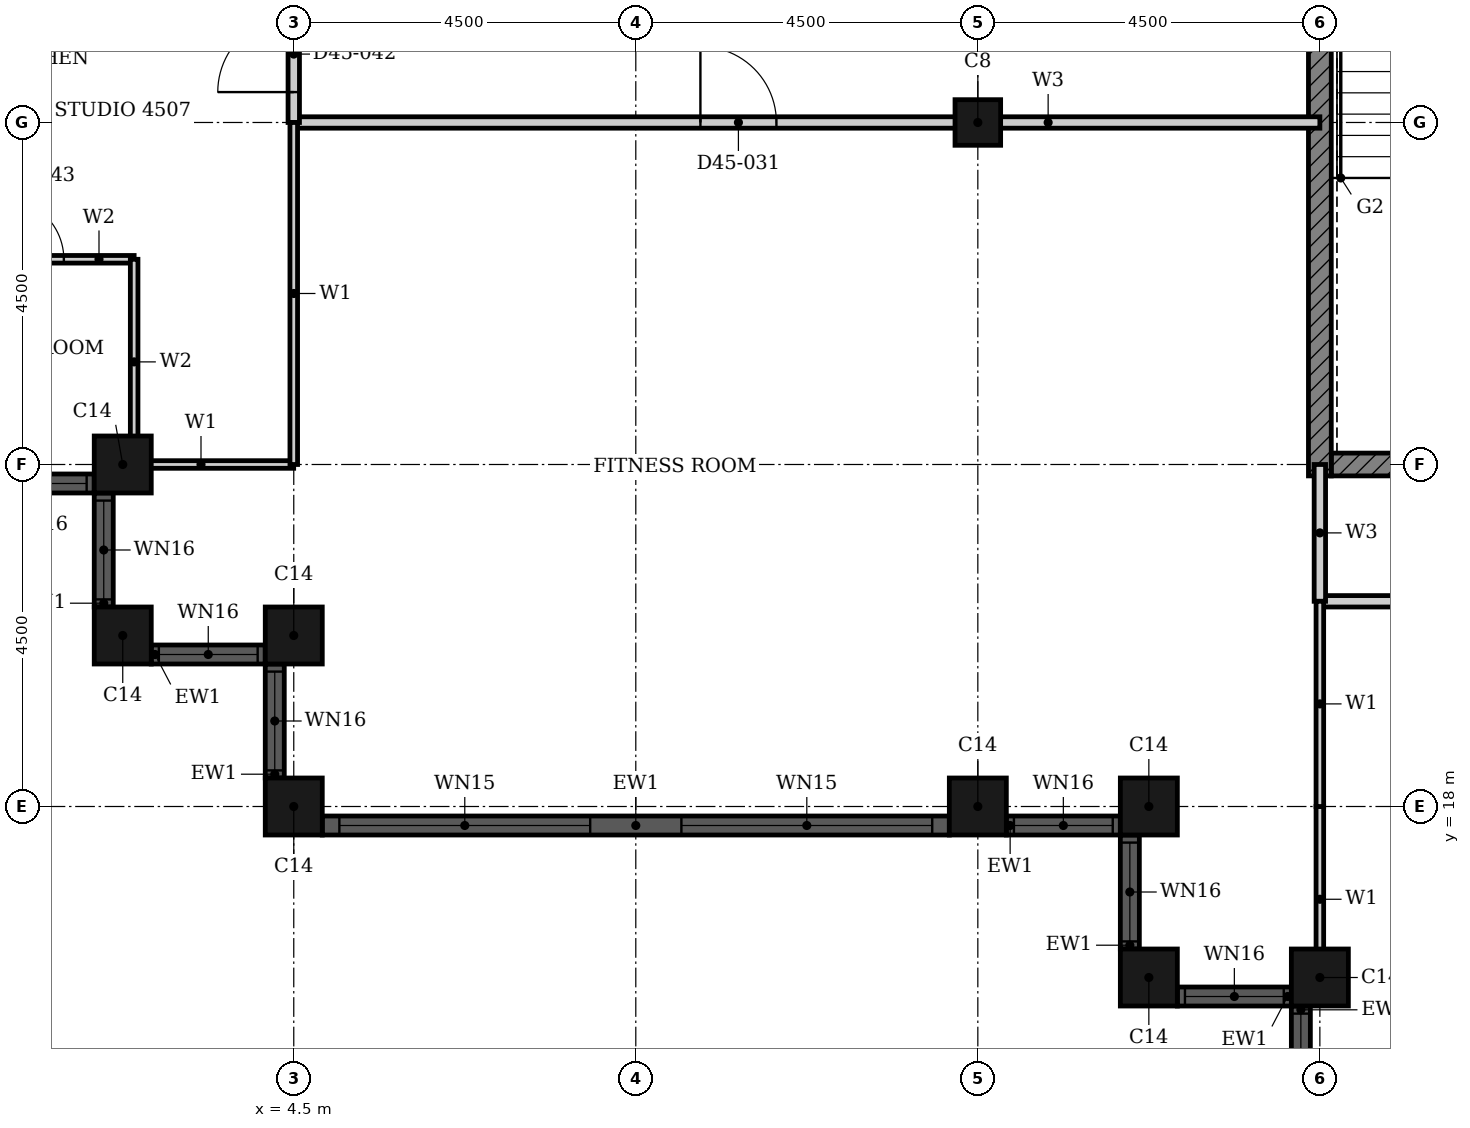
"""IFC4 building model, lengths in metres.
Left out: names, types, materials, properties, quantities, classifications, styles, units other than length and angle.
Written with IfcOpenShell. Run it as: python <this file> out.ifc"""

import sys

from ifc_helpers import new_model, si_unit, direction, frame, frame_2d, origin, origin_2d, place, context, subcontext, project, spatial, rectangle, hollow_rectangle, extrude, element, fill, save


model = new_model("IFC4")
c1 = context("Model", 3, precision=1e-05, world=origin(), true_north=direction((0.0, 1.0)))
c2 = subcontext(c1, "Body", "Model", "MODEL_VIEW")
j1 = project(units=[si_unit("LENGTHUNIT", "METRE"), si_unit("PLANEANGLEUNIT", "RADIAN")], contexts=[c1])
p1 = place(None, origin())
s1 = spatial("IfcSite", under=j1, at=p1, CompositionType="ELEMENT")
p2 = place(p1, origin())
s2 = spatial("IfcBuilding", under=s1, at=p2, CompositionType="ELEMENT")
p3 = place(p2, frame((0.0, 0.0, 180.2)))
s3 = spatial("IfcBuildingStorey", under=s2, at=p3, CompositionType="ELEMENT", Elevation=180.2)
for number, where, z_axis, x_axis in (
    (1, (2.25, 22.5, 0.0), (0.0, 0.0, 1.0), (1.0, 0.0, 0.0)),
    (2, (2.25, 20.25, 0.0), (0.0, 0.0, 1.0), (1.0, 0.0, 0.0)),
    (3, (4.5, 20.25, 0.0), (0.0, 0.0, 1.0), (1.0, 0.0, 0.0)),
    (4, (4.5, 18.0, 0.0), (0.0, 0.0, 1.0), (1.0, 0.0, 0.0)),
    (5, (13.5, 18.0, 0.0), (0.0, 0.0, 1.0), (1.0, 0.0, 0.0)),
    (6, (15.75, 18.0, 0.0), (0.0, 0.0, 1.0), (1.0, 0.0, 0.0)),
    (7, (15.75, 15.75, 0.0), (0.0, 0.0, 1.0), (1.0, 0.0, 0.0)),
    (8, (18.0, 15.75, 0.0), (0.0, 0.0, 1.0), (1.0, 0.0, 0.0)),
):
    element("IfcColumn", number, at=place(p3, frame(where, z_axis=z_axis, x_axis=x_axis)), inside=s3, PredefinedType="COLUMN", context=c2, shape_type="SweptSolid", body=[
        extrude(hollow_rectangle(XDim=0.75, YDim=0.75, WallThickness=0.024, at=origin_2d()), origin(), (0.0, 0.0, 1.0), 3.7),
    ])
p4 = place(p3, frame((13.5, 27.0, 0.0), z_axis=(0.0, 0.0, 1.0), x_axis=(1.0, 0.0, 0.0)))
e9 = element("IfcColumn", 9, at=p4, inside=s3, PredefinedType="COLUMN", context=c2, shape_type="SweptSolid", body=[
    extrude(hollow_rectangle(XDim=0.6, YDim=0.6, WallThickness=0.02, at=origin_2d()), origin(), (0.0, 0.0, 1.0), 3.7),
])
p5 = place(p3, frame((0.375, 22.25, 0.0), z_axis=(0.0, 0.0, 1.0), x_axis=(1.0, 0.0, 0.0)))
e10 = element("IfcWall", 10, at=p5, inside=s3, PredefinedType="SOLIDWALL", context=c2, shape_type="SweptSolid", body=[
    extrude(rectangle(XDim=1.5, YDim=0.25, at=frame_2d((0.75, 0.0))), origin(), (0.0, 0.0, 1.0), 3.7),
])
p6 = place(p5, frame((0.1, 0.0, 0.9)))
e11 = element("IfcOpeningElement", 11, at=p6, cuts=e10, PredefinedType="OPENING", context=c2, shape_type="SweptSolid", body=[
    extrude(rectangle(XDim=1.3, YDim=1.85, at=frame_2d((0.65, 0.925))), frame((0.0, 0.135, 0.0), z_axis=(0.0, -1.0, 0.0), x_axis=(1.0, 0.0, 0.0)), (0.0, 0.0, 1.0), 0.27),
])
p7 = place(p3, frame((2.0, 22.125, 0.0), z_axis=(0.0, 0.0, 1.0), x_axis=(0.0, -1.0, 0.0)))
e12 = element("IfcWall", 12, at=p7, inside=s3, PredefinedType="SOLIDWALL", context=c2, shape_type="SweptSolid", body=[
    extrude(rectangle(XDim=1.5, YDim=0.25, at=frame_2d((0.75, 0.0))), origin(), (0.0, 0.0, 1.0), 3.7),
])
p8 = place(p7, frame((0.1, 0.0, 0.9)))
e13 = element("IfcOpeningElement", 13, at=p8, cuts=e12, PredefinedType="OPENING", context=c2, shape_type="SweptSolid", body=[
    extrude(rectangle(XDim=1.3, YDim=1.85, at=frame_2d((0.65, 0.925))), frame((0.0, 0.135, 0.0), z_axis=(0.0, -1.0, 0.0), x_axis=(1.0, 0.0, 0.0)), (0.0, 0.0, 1.0), 0.27),
])
p9 = place(p3, frame((2.625, 20.0, 0.0), z_axis=(0.0, 0.0, 1.0), x_axis=(1.0, 0.0, 0.0)))
e14 = element("IfcWall", 14, at=p9, inside=s3, PredefinedType="SOLIDWALL", context=c2, shape_type="SweptSolid", body=[
    extrude(rectangle(XDim=1.5, YDim=0.25, at=frame_2d((0.75, 0.0))), origin(), (0.0, 0.0, 1.0), 3.7),
])
p10 = place(p9, frame((0.1, 0.0, 0.9)))
e15 = element("IfcOpeningElement", 15, at=p10, cuts=e14, PredefinedType="OPENING", context=c2, shape_type="SweptSolid", body=[
    extrude(rectangle(XDim=1.3, YDim=1.85, at=frame_2d((0.65, 0.925))), frame((0.0, 0.135, 0.0), z_axis=(0.0, -1.0, 0.0), x_axis=(1.0, 0.0, 0.0)), (0.0, 0.0, 1.0), 0.27),
])
p11 = place(p3, frame((4.25, 19.875, 0.0), z_axis=(0.0, 0.0, 1.0), x_axis=(0.0, -1.0, 0.0)))
e16 = element("IfcWall", 16, at=p11, inside=s3, PredefinedType="SOLIDWALL", context=c2, shape_type="SweptSolid", body=[
    extrude(rectangle(XDim=1.5, YDim=0.25, at=frame_2d((0.75, 0.0))), origin(), (0.0, 0.0, 1.0), 3.7),
])
p12 = place(p11, frame((0.1, 0.0, 0.9)))
e17 = element("IfcOpeningElement", 17, at=p12, cuts=e16, PredefinedType="OPENING", context=c2, shape_type="SweptSolid", body=[
    extrude(rectangle(XDim=1.3, YDim=1.85, at=frame_2d((0.65, 0.925))), frame((0.0, 0.135, 0.0), z_axis=(0.0, -1.0, 0.0), x_axis=(1.0, 0.0, 0.0)), (0.0, 0.0, 1.0), 0.27),
])
p13 = place(p3, frame((4.875, 17.75, 0.0), z_axis=(0.0, 0.0, 1.0), x_axis=(1.0, 0.0, 0.0)))
e18 = element("IfcWall", 18, at=p13, inside=s3, PredefinedType="SOLIDWALL", context=c2, shape_type="SweptSolid", body=[
    extrude(rectangle(XDim=8.25, YDim=0.25, at=frame_2d((4.125, 0.0))), origin(), (0.0, 0.0, 1.0), 3.7),
])
p14 = place(p13, frame((0.225, 0.0, 0.45)))
e19 = element("IfcOpeningElement", 19, at=p14, cuts=e18, PredefinedType="OPENING", context=c2, shape_type="SweptSolid", body=[
    extrude(rectangle(XDim=3.3, YDim=2.3, at=frame_2d((1.65, 1.15))), frame((0.0, 0.135, 0.0), z_axis=(0.0, -1.0, 0.0), x_axis=(1.0, 0.0, 0.0)), (0.0, 0.0, 1.0), 0.27),
])
p15 = place(p13, frame((4.725, 0.0, 0.45)))
e20 = element("IfcOpeningElement", 20, at=p15, cuts=e18, PredefinedType="OPENING", context=c2, shape_type="SweptSolid", body=[
    extrude(rectangle(XDim=3.3, YDim=2.3, at=frame_2d((1.65, 1.15))), frame((0.0, 0.135, 0.0), z_axis=(0.0, -1.0, 0.0), x_axis=(1.0, 0.0, 0.0)), (0.0, 0.0, 1.0), 0.27),
])
p16 = place(p3, frame((13.875, 17.75, 0.0), z_axis=(0.0, 0.0, 1.0), x_axis=(1.0, 0.0, 0.0)))
e21 = element("IfcWall", 21, at=p16, inside=s3, PredefinedType="SOLIDWALL", context=c2, shape_type="SweptSolid", body=[
    extrude(rectangle(XDim=1.5, YDim=0.25, at=frame_2d((0.75, 0.0))), origin(), (0.0, 0.0, 1.0), 3.7),
])
p17 = place(p16, frame((0.1, 0.0, 0.9)))
e22 = element("IfcOpeningElement", 22, at=p17, cuts=e21, PredefinedType="OPENING", context=c2, shape_type="SweptSolid", body=[
    extrude(rectangle(XDim=1.3, YDim=1.85, at=frame_2d((0.65, 0.925))), frame((0.0, 0.135, 0.0), z_axis=(0.0, -1.0, 0.0), x_axis=(1.0, 0.0, 0.0)), (0.0, 0.0, 1.0), 0.27),
])
p18 = place(p3, frame((15.5, 17.625, 0.0), z_axis=(0.0, 0.0, 1.0), x_axis=(0.0, -1.0, 0.0)))
e23 = element("IfcWall", 23, at=p18, inside=s3, PredefinedType="SOLIDWALL", context=c2, shape_type="SweptSolid", body=[
    extrude(rectangle(XDim=1.5, YDim=0.25, at=frame_2d((0.75, 0.0))), origin(), (0.0, 0.0, 1.0), 3.7),
])
p19 = place(p18, frame((0.1, 0.0, 0.9)))
e24 = element("IfcOpeningElement", 24, at=p19, cuts=e23, PredefinedType="OPENING", context=c2, shape_type="SweptSolid", body=[
    extrude(rectangle(XDim=1.3, YDim=1.85, at=frame_2d((0.65, 0.925))), frame((0.0, 0.135, 0.0), z_axis=(0.0, -1.0, 0.0), x_axis=(1.0, 0.0, 0.0)), (0.0, 0.0, 1.0), 0.27),
])
p20 = place(p3, frame((16.125, 15.5, 0.0), z_axis=(0.0, 0.0, 1.0), x_axis=(1.0, 0.0, 0.0)))
e25 = element("IfcWall", 25, at=p20, inside=s3, PredefinedType="SOLIDWALL", context=c2, shape_type="SweptSolid", body=[
    extrude(rectangle(XDim=1.5, YDim=0.25, at=frame_2d((0.75, 0.0))), origin(), (0.0, 0.0, 1.0), 3.7),
])
p21 = place(p20, frame((0.1, 0.0, 0.9)))
e26 = element("IfcOpeningElement", 26, at=p21, cuts=e25, PredefinedType="OPENING", context=c2, shape_type="SweptSolid", body=[
    extrude(rectangle(XDim=1.3, YDim=1.85, at=frame_2d((0.65, 0.925))), frame((0.0, 0.135, 0.0), z_axis=(0.0, -1.0, 0.0), x_axis=(1.0, 0.0, 0.0)), (0.0, 0.0, 1.0), 0.27),
])
p22 = place(p3, frame((17.75, 15.375, 0.0), z_axis=(0.0, 0.0, 1.0), x_axis=(0.0, -1.0, 0.0)))
e27 = element("IfcWall", 27, at=p22, inside=s3, PredefinedType="SOLIDWALL", context=c2, shape_type="SweptSolid", body=[
    extrude(rectangle(XDim=1.5, YDim=0.25, at=frame_2d((0.75, 0.0))), origin(), (0.0, 0.0, 1.0), 3.7),
])
p23 = place(p22, frame((0.1, 0.0, 0.9)))
e28 = element("IfcOpeningElement", 28, at=p23, cuts=e27, PredefinedType="OPENING", context=c2, shape_type="SweptSolid", body=[
    extrude(rectangle(XDim=1.3, YDim=1.85, at=frame_2d((0.65, 0.925))), frame((0.0, 0.135, 0.0), z_axis=(0.0, -1.0, 0.0), x_axis=(1.0, 0.0, 0.0)), (0.0, 0.0, 1.0), 0.27),
])
p24 = place(p3, frame((18.15, 22.5, 0.0), z_axis=(0.0, 0.0, 1.0), x_axis=(1.0, 0.0, 0.0)))
e29 = element("IfcWall", 29, at=p24, inside=s3, PredefinedType="SHEAR", context=c2, shape_type="SweptSolid", body=[
    extrude(rectangle(XDim=4.225, YDim=0.3, at=frame_2d((2.113, 0.0))), origin(), (0.0, 0.0, 1.0), 3.4),
])
p25 = place(p3, frame((18.0, 22.35, 0.0), z_axis=(0.0, 0.0, 1.0), x_axis=(0.0, 1.0, 0.0)))
e30 = element("IfcWall", 30, at=p25, inside=s3, PredefinedType="SHEAR", context=c2, shape_type="SweptSolid", body=[
    extrude(rectangle(XDim=9.3, YDim=0.3, at=frame_2d((4.65, 0.0))), origin(), (0.0, 0.0, 1.0), 3.4),
])
p26 = place(p3, frame((18.0, 20.7, 0.0), z_axis=(0.0, 0.0, 1.0), x_axis=(1.0, 0.0, 0.0)))
e31 = element("IfcWall", 31, at=p26, inside=s3, PredefinedType="PARTITIONING", context=c2, shape_type="SweptSolid", body=[
    extrude(rectangle(XDim=13.5, YDim=0.15, at=frame_2d((6.75, 0.0))), origin(), (0.0, 0.0, 1.0), 3.4),
])
p27 = place(p26, frame((6.25, 0.0, 0.0)))
e32 = element("IfcOpeningElement", 32, at=p27, cuts=e31, PredefinedType="OPENING", context=c2, shape_type="SweptSolid", body=[
    extrude(rectangle(XDim=1.0, YDim=2.1, at=frame_2d((0.5, 1.05))), frame((0.0, 0.085, 0.0), z_axis=(0.0, -1.0, 0.0), x_axis=(1.0, 0.0, 0.0)), (0.0, 0.0, 1.0), 0.17),
])
p28 = place(p3, frame((4.5, 27.0, 0.0), z_axis=(0.0, 0.0, 1.0), x_axis=(1.0, 0.0, 0.0)))
e33 = element("IfcWall", 33, at=p28, inside=s3, PredefinedType="PARTITIONING", context=c2, shape_type="SweptSolid", body=[
    extrude(rectangle(XDim=13.5, YDim=0.15, at=frame_2d((6.75, 0.0))), origin(), (0.0, 0.0, 1.0), 2.68),
])
p29 = place(p28, frame((5.35, 0.0, 0.0)))
e34 = element("IfcOpeningElement", 34, at=p29, cuts=e33, PredefinedType="OPENING", context=c2, shape_type="SweptSolid", body=[
    extrude(rectangle(XDim=1.0, YDim=2.1, at=frame_2d((0.5, 1.05))), frame((0.0, 0.085, 0.0), z_axis=(0.0, -1.0, 0.0), x_axis=(1.0, 0.0, 0.0)), (0.0, 0.0, 1.0), 0.17),
])
p30 = place(p3, frame((18.0, 20.7, 0.0), z_axis=(0.0, 0.0, 1.0), x_axis=(0.0, 1.0, 0.0)))
e35 = element("IfcWall", 35, at=p30, inside=s3, PredefinedType="PARTITIONING", context=c2, shape_type="SweptSolid", body=[
    extrude(rectangle(XDim=1.8, YDim=0.15, at=frame_2d((0.9, 0.0))), origin(), (0.0, 0.0, 1.0), 3.4),
])
p31 = place(p3, frame((4.5, 27.0, 0.0), z_axis=(0.0, 0.0, 1.0), x_axis=(0.0, 1.0, 0.0)))
e36 = element("IfcWall", 36, at=p31, inside=s3, PredefinedType="PARTITIONING", context=c2, shape_type="SweptSolid", body=[
    extrude(rectangle(XDim=1.8, YDim=0.15, at=frame_2d((0.9, 0.0))), origin(), (0.0, 0.0, 1.0), 3.4),
])
p32 = place(p31, frame((0.4, 0.0, 0.0)))
e37 = element("IfcOpeningElement", 37, at=p32, cuts=e36, PredefinedType="OPENING", context=c2, shape_type="SweptSolid", body=[
    extrude(rectangle(XDim=1.0, YDim=2.2, at=frame_2d((0.5, 1.1))), frame((0.0, 0.085, 0.0), z_axis=(0.0, -1.0, 0.0), x_axis=(1.0, 0.0, 0.0)), (0.0, 0.0, 1.0), 0.17),
])
p33 = place(p3, frame((2.06, 22.5, 0.0), z_axis=(0.0, 0.0, 1.0), x_axis=(1.0, 0.0, 0.0)))
e38 = element("IfcWall", 38, at=p33, inside=s3, PredefinedType="PARTITIONING", context=c2, shape_type="SweptSolid", body=[
    extrude(rectangle(XDim=2.439, YDim=0.1, at=frame_2d((1.219, 0.0))), origin(), (0.0, 0.0, 1.0), 2.68),
])
p34 = place(p3, frame((18.0, 15.56, 0.0), z_axis=(0.0, 0.0, 1.0), x_axis=(0.0, 1.0, 0.0)))
e39 = element("IfcWall", 39, at=p34, inside=s3, PredefinedType="PARTITIONING", context=c2, shape_type="SweptSolid", body=[
    extrude(rectangle(XDim=2.439, YDim=0.1, at=frame_2d((1.219, 0.0))), origin(), (0.0, 0.0, 1.0), 3.4),
])
p35 = place(p3, frame((18.0, 18.0, 0.0), z_axis=(0.0, 0.0, 1.0), x_axis=(0.0, 1.0, 0.0)))
e40 = element("IfcWall", 40, at=p35, inside=s3, PredefinedType="PARTITIONING", context=c2, shape_type="SweptSolid", body=[
    extrude(rectangle(XDim=2.7, YDim=0.1, at=frame_2d((1.35, 0.0))), origin(), (0.0, 0.0, 1.0), 3.4),
])
p36 = place(p3, frame((4.5, 22.5, 0.0), z_axis=(0.0, 0.0, 1.0), x_axis=(0.0, 1.0, 0.0)))
e41 = element("IfcWall", 41, at=p36, inside=s3, PredefinedType="PARTITIONING", context=c2, shape_type="SweptSolid", body=[
    extrude(rectangle(XDim=4.5, YDim=0.1, at=frame_2d((2.25, 0.0))), origin(), (0.0, 0.0, 1.0), 3.4),
])
p37 = place(p3, frame((-0.125, 25.2, 0.0), z_axis=(0.0, 0.0, 1.0), x_axis=(1.0, 0.0, 0.0)))
e42 = element("IfcWall", 42, at=p37, inside=s3, PredefinedType="PARTITIONING", context=c2, shape_type="SweptSolid", body=[
    extrude(rectangle(XDim=2.525, YDim=0.1, at=frame_2d((1.262, 0.0))), origin(), (0.0, 0.0, 1.0), 3.4),
])
p38 = place(p37, frame((0.8, 0.0, 0.0)))
e43 = element("IfcOpeningElement", 43, at=p38, cuts=e42, PredefinedType="OPENING", context=c2, shape_type="SweptSolid", body=[
    extrude(rectangle(XDim=0.8, YDim=2.1, at=frame_2d((0.4, 1.05))), frame((0.0, 0.06, 0.0), z_axis=(0.0, -1.0, 0.0), x_axis=(1.0, 0.0, 0.0)), (0.0, 0.0, 1.0), 0.12),
])
p39 = place(p3, frame((2.4, 22.5, 0.0), z_axis=(0.0, 0.0, 1.0), x_axis=(0.0, 1.0, 0.0)))
e44 = element("IfcWall", 44, at=p39, inside=s3, PredefinedType="PARTITIONING", context=c2, shape_type="SweptSolid", body=[
    extrude(rectangle(XDim=2.7, YDim=0.1, at=frame_2d((1.35, 0.0))), origin(), (0.0, 0.0, 1.0), 3.4),
])
p40 = place(p6, origin())
e45 = element("IfcWindow", 45, at=p40, inside=s3, PartitioningType="SINGLE_PANEL", PredefinedType="WINDOW", context=c2, shape_type="SweptSolid", body=[
    extrude(rectangle(XDim=1.3, YDim=1.85, at=frame_2d((0.65, 0.925))), frame((0.0, 0.03, 0.0), z_axis=(0.0, -1.0, 0.0), x_axis=(1.0, 0.0, 0.0)), (0.0, 0.0, 1.0), 0.06),
])
fill(e11, e45)
p41 = place(p8, origin())
e46 = element("IfcWindow", 46, at=p41, inside=s3, PartitioningType="SINGLE_PANEL", PredefinedType="WINDOW", context=c2, shape_type="SweptSolid", body=[
    extrude(rectangle(XDim=1.3, YDim=1.85, at=frame_2d((0.65, 0.925))), frame((0.0, 0.03, 0.0), z_axis=(0.0, -1.0, 0.0), x_axis=(1.0, 0.0, 0.0)), (0.0, 0.0, 1.0), 0.06),
])
fill(e13, e46)
p42 = place(p10, origin())
e47 = element("IfcWindow", 47, at=p42, inside=s3, PartitioningType="SINGLE_PANEL", PredefinedType="WINDOW", context=c2, shape_type="SweptSolid", body=[
    extrude(rectangle(XDim=1.3, YDim=1.85, at=frame_2d((0.65, 0.925))), frame((0.0, 0.03, 0.0), z_axis=(0.0, -1.0, 0.0), x_axis=(1.0, 0.0, 0.0)), (0.0, 0.0, 1.0), 0.06),
])
fill(e15, e47)
p43 = place(p12, origin())
e48 = element("IfcWindow", 48, at=p43, inside=s3, PartitioningType="SINGLE_PANEL", PredefinedType="WINDOW", context=c2, shape_type="SweptSolid", body=[
    extrude(rectangle(XDim=1.3, YDim=1.85, at=frame_2d((0.65, 0.925))), frame((0.0, 0.03, 0.0), z_axis=(0.0, -1.0, 0.0), x_axis=(1.0, 0.0, 0.0)), (0.0, 0.0, 1.0), 0.06),
])
fill(e17, e48)
p44 = place(p14, origin())
e49 = element("IfcWindow", 49, at=p44, inside=s3, PartitioningType="SINGLE_PANEL", PredefinedType="WINDOW", context=c2, shape_type="SweptSolid", body=[
    extrude(rectangle(XDim=3.3, YDim=2.3, at=frame_2d((1.65, 1.15))), frame((0.0, 0.03, 0.0), z_axis=(0.0, -1.0, 0.0), x_axis=(1.0, 0.0, 0.0)), (0.0, 0.0, 1.0), 0.06),
])
fill(e19, e49)
p45 = place(p15, origin())
e50 = element("IfcWindow", 50, at=p45, inside=s3, PartitioningType="SINGLE_PANEL", PredefinedType="WINDOW", context=c2, shape_type="SweptSolid", body=[
    extrude(rectangle(XDim=3.3, YDim=2.3, at=frame_2d((1.65, 1.15))), frame((0.0, 0.03, 0.0), z_axis=(0.0, -1.0, 0.0), x_axis=(1.0, 0.0, 0.0)), (0.0, 0.0, 1.0), 0.06),
])
fill(e20, e50)
p46 = place(p17, origin())
e51 = element("IfcWindow", 51, at=p46, inside=s3, PartitioningType="SINGLE_PANEL", PredefinedType="WINDOW", context=c2, shape_type="SweptSolid", body=[
    extrude(rectangle(XDim=1.3, YDim=1.85, at=frame_2d((0.65, 0.925))), frame((0.0, 0.03, 0.0), z_axis=(0.0, -1.0, 0.0), x_axis=(1.0, 0.0, 0.0)), (0.0, 0.0, 1.0), 0.06),
])
fill(e22, e51)
p47 = place(p19, origin())
e52 = element("IfcWindow", 52, at=p47, inside=s3, PartitioningType="SINGLE_PANEL", PredefinedType="WINDOW", context=c2, shape_type="SweptSolid", body=[
    extrude(rectangle(XDim=1.3, YDim=1.85, at=frame_2d((0.65, 0.925))), frame((0.0, 0.03, 0.0), z_axis=(0.0, -1.0, 0.0), x_axis=(1.0, 0.0, 0.0)), (0.0, 0.0, 1.0), 0.06),
])
fill(e24, e52)
p48 = place(p21, origin())
e53 = element("IfcWindow", 53, at=p48, inside=s3, PartitioningType="SINGLE_PANEL", PredefinedType="WINDOW", context=c2, shape_type="SweptSolid", body=[
    extrude(rectangle(XDim=1.3, YDim=1.85, at=frame_2d((0.65, 0.925))), frame((0.0, 0.03, 0.0), z_axis=(0.0, -1.0, 0.0), x_axis=(1.0, 0.0, 0.0)), (0.0, 0.0, 1.0), 0.06),
])
fill(e26, e53)
p49 = place(p23, origin())
e54 = element("IfcWindow", 54, at=p49, inside=s3, PartitioningType="SINGLE_PANEL", PredefinedType="WINDOW", context=c2, shape_type="SweptSolid", body=[
    extrude(rectangle(XDim=1.3, YDim=1.85, at=frame_2d((0.65, 0.925))), frame((0.0, 0.03, 0.0), z_axis=(0.0, -1.0, 0.0), x_axis=(1.0, 0.0, 0.0)), (0.0, 0.0, 1.0), 0.06),
])
fill(e28, e54)
p50 = place(p29, origin())
e55 = element("IfcDoor", 55, at=p50, inside=s3, OperationType="SINGLE_SWING_LEFT", PredefinedType="DOOR", context=c2, shape_type="SweptSolid", body=[
    extrude(rectangle(XDim=1.0, YDim=2.1, at=frame_2d((0.5, 1.05))), frame((0.0, 0.025, 0.0), z_axis=(0.0, -1.0, 0.0), x_axis=(1.0, 0.0, 0.0)), (0.0, 0.0, 1.0), 0.05),
])
fill(e34, e55)
p51 = place(p32, origin())
e56 = element("IfcDoor", 56, at=p51, inside=s3, OperationType="SINGLE_SWING_LEFT", PredefinedType="DOOR", context=c2, shape_type="SweptSolid", body=[
    extrude(rectangle(XDim=1.0, YDim=2.2, at=frame_2d((0.5, 1.1))), frame((0.0, 0.025, 0.0), z_axis=(0.0, -1.0, 0.0), x_axis=(1.0, 0.0, 0.0)), (0.0, 0.0, 1.0), 0.05),
])
fill(e37, e56)
p52 = place(p38, origin())
e57 = element("IfcDoor", 57, at=p52, inside=s3, OperationType="SINGLE_SWING_LEFT", PredefinedType="DOOR", context=c2, shape_type="SweptSolid", body=[
    extrude(rectangle(XDim=0.8, YDim=2.1, at=frame_2d((0.4, 1.05))), frame((0.0, 0.025, 0.0), z_axis=(0.0, -1.0, 0.0), x_axis=(1.0, 0.0, 0.0)), (0.0, 0.0, 1.0), 0.05),
])
fill(e43, e57)
save(model, sys.argv[1])
